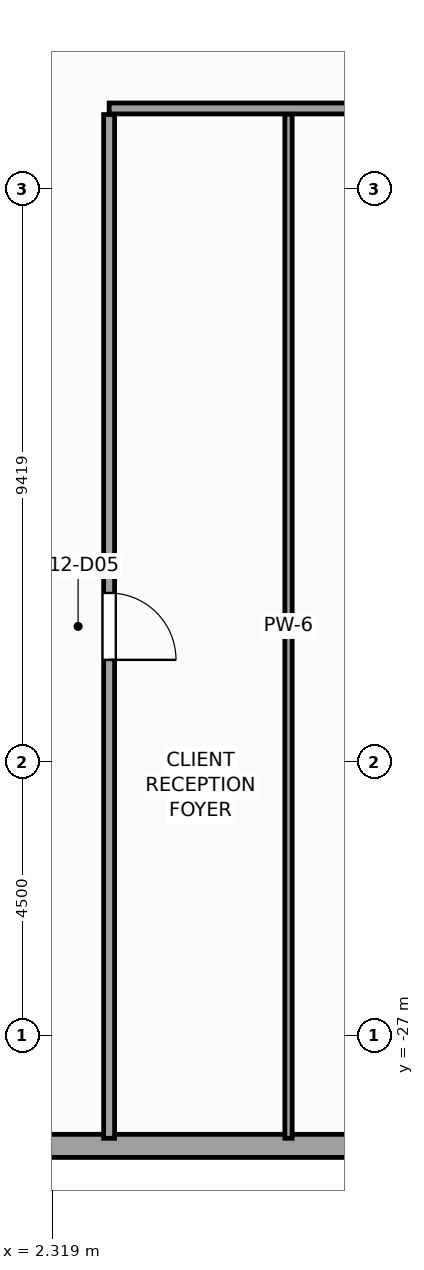
"""IFC4 building model, lengths in metres.
Left out: names, types, materials, properties, quantities, classifications, styles, units other than length and angle.
Written with IfcOpenShell. Run it as: python <this file> out.ifc"""

import sys

from ifc_helpers import new_model, si_unit, direction, frame, frame_2d, origin, place, context, subcontext, project, spatial, rectangle, extrude, source, transform, mapped, element, fill, save


model = new_model("IFC4")
c1 = context("Model", 3, precision=1e-05, world=origin(), true_north=direction((0.0, 1.0)))
c2 = subcontext(c1, "Body", "Model", "MODEL_VIEW")
j1 = project(units=[si_unit("LENGTHUNIT", "METRE"), si_unit("PLANEANGLEUNIT", "RADIAN")], contexts=[c1])
p1 = place(None, origin())
s1 = spatial("IfcSite", under=j1, at=p1, CompositionType="ELEMENT")
p2 = place(p1, origin())
s2 = spatial("IfcBuilding", under=s1, at=p2, CompositionType="ELEMENT")
p3 = place(p2, frame((0.0, 0.0, 54.0)))
s3 = spatial("IfcBuildingStorey", under=s2, at=p3, CompositionType="ELEMENT", Elevation=54.0)
p4 = place(p3, frame((-25.69, -28.81, 0.0), z_axis=(0.0, 0.0, 1.0), x_axis=(1.0, 0.0, 0.0)))
e1 = element("IfcWall", 1, at=p4, inside=s3, PredefinedType="STANDARD", context=c2, shape_type="SweptSolid", body=[
    extrude(rectangle(XDim=51.38, YDim=0.38, at=frame_2d((25.69, 0.0))), origin(), (0.0, 0.0, 1.0), 3.12),
])
p5 = place(p4, frame((18.715, 0.0, 0.0)))
e2 = element("IfcOpeningElement", 2, at=p5, cuts=e1, PredefinedType="OPENING", context=c2, shape_type="SweptSolid", body=[
    extrude(rectangle(XDim=1.05, YDim=2.25, at=frame_2d((0.525, 1.125))), frame((0.0, 0.2, 0.0), z_axis=(0.0, -1.0, 0.0), x_axis=(1.0, 0.0, 0.0)), (0.0, 0.0, 1.0), 0.4),
])
p6 = place(p4, frame((5.466, 0.0, 0.49)))
e3 = element("IfcOpeningElement", 3, at=p6, cuts=e1, PredefinedType="OPENING", context=c2, shape_type="SweptSolid", body=[
    extrude(rectangle(XDim=1.4, YDim=2.4, at=frame_2d((0.7, 1.2))), frame((0.0, 0.2, 0.0), z_axis=(0.0, -1.0, 0.0), x_axis=(1.0, 0.0, 0.0)), (0.0, 0.0, 1.0), 0.4),
])
p7 = place(p4, frame((13.8, 0.0, 0.49)))
e4 = element("IfcOpeningElement", 4, at=p7, cuts=e1, PredefinedType="OPENING", context=c2, shape_type="SweptSolid", body=[
    extrude(rectangle(XDim=2.2, YDim=2.4, at=frame_2d((1.1, 1.2))), frame((0.0, 0.2, 0.0), z_axis=(0.0, -1.0, 0.0), x_axis=(1.0, 0.0, 0.0)), (0.0, 0.0, 1.0), 0.4),
])
p8 = place(p4, frame((22.062, 0.0, 0.49)))
e5 = element("IfcOpeningElement", 5, at=p8, cuts=e1, PredefinedType="OPENING", context=c2, shape_type="SweptSolid", body=[
    extrude(rectangle(XDim=2.2, YDim=2.4, at=frame_2d((1.1, 1.2))), frame((0.0, 0.2, 0.0), z_axis=(0.0, -1.0, 0.0), x_axis=(1.0, 0.0, 0.0)), (0.0, 0.0, 1.0), 0.4),
])
p9 = place(p4, frame((33.838, 0.0, 0.49)))
e6 = element("IfcOpeningElement", 6, at=p9, cuts=e1, PredefinedType="OPENING", context=c2, shape_type="SweptSolid", body=[
    extrude(rectangle(XDim=2.2, YDim=2.4, at=frame_2d((1.1, 1.2))), frame((0.0, 0.2, 0.0), z_axis=(0.0, -1.0, 0.0), x_axis=(1.0, 0.0, 0.0)), (0.0, 0.0, 1.0), 0.4),
])
p10 = place(p4, frame((43.487, 0.0, 0.49)))
e7 = element("IfcOpeningElement", 7, at=p10, cuts=e1, PredefinedType="OPENING", context=c2, shape_type="SweptSolid", body=[
    extrude(rectangle(XDim=1.4, YDim=2.4, at=frame_2d((0.7, 1.2))), frame((0.0, 0.2, 0.0), z_axis=(0.0, -1.0, 0.0), x_axis=(1.0, 0.0, 0.0)), (0.0, 0.0, 1.0), 0.4),
])
p11 = place(p3, frame((3.25, -11.75, 0.0), z_axis=(0.0, 0.0, 1.0), x_axis=(1.0, 0.0, 0.0)))
e8 = element("IfcWall", 8, at=p11, inside=s3, PredefinedType="PARTITIONING", context=c2, shape_type="SweptSolid", body=[
    extrude(rectangle(XDim=7.35, YDim=0.18, at=frame_2d((3.675, 0.0))), origin(), (0.0, 0.0, 1.0), 3.72),
])
p12 = place(p3, frame((3.25, -28.685, 0.0), z_axis=(0.0, 0.0, 1.0), x_axis=(0.0, 1.0, 0.0)))
e9 = element("IfcWall", 9, at=p12, inside=s3, PredefinedType="PARTITIONING", context=c2, shape_type="SweptSolid", body=[
    extrude(rectangle(XDim=16.835, YDim=0.18, at=frame_2d((8.417, 0.0))), origin(), (0.0, 0.0, 1.0), 3.72),
])
p13 = place(p12, frame((7.867, 0.0, 0.0)))
e10 = element("IfcOpeningElement", 10, at=p13, cuts=e9, PredefinedType="OPENING", context=c2, shape_type="SweptSolid", body=[
    extrude(rectangle(XDim=1.1, YDim=2.2, at=frame_2d((0.55, 1.1))), frame((0.0, 0.1, 0.0), z_axis=(0.0, -1.0, 0.0), x_axis=(1.0, 0.0, 0.0)), (0.0, 0.0, 1.0), 0.2),
])
p14 = place(p3, frame((6.2, -28.685, 0.0), z_axis=(0.0, 0.0, 1.0), x_axis=(0.0, 1.0, 0.0)))
e11 = element("IfcWall", 11, at=p14, inside=s3, PredefinedType="PARTITIONING", context=c2, shape_type="SweptSolid", body=[
    extrude(rectangle(XDim=16.84, YDim=0.12, at=frame_2d((8.42, 0.0))), origin(), (0.0, 0.0, 1.0), 3.72),
])
m1 = source(origin(), c2, "Body", "SweptSolid", [
    extrude(rectangle(XDim=1.1, YDim=2.2, at=frame_2d((0.55, 1.1))), frame((0.0, 0.025, 0.0), z_axis=(0.0, -1.0, 0.0), x_axis=(1.0, 0.0, 0.0)), (0.0, 0.0, 1.0), 0.05),
])
p15 = place(p13, frame((1.1, 0.0, 0.0), z_axis=(0.0, 0.0, 1.0), x_axis=(-1.0, 0.0, 0.0)))
e12 = element("IfcDoor", 12, at=p15, inside=s3, OperationType="SINGLE_SWING_LEFT", PredefinedType="DOOR", context=c2, shape_type="MappedRepresentation", body=[
    mapped(m1, transform((0.0, 0.0, 0.0), scale=1.0)),
])
fill(e10, e12)
save(model, sys.argv[1])
